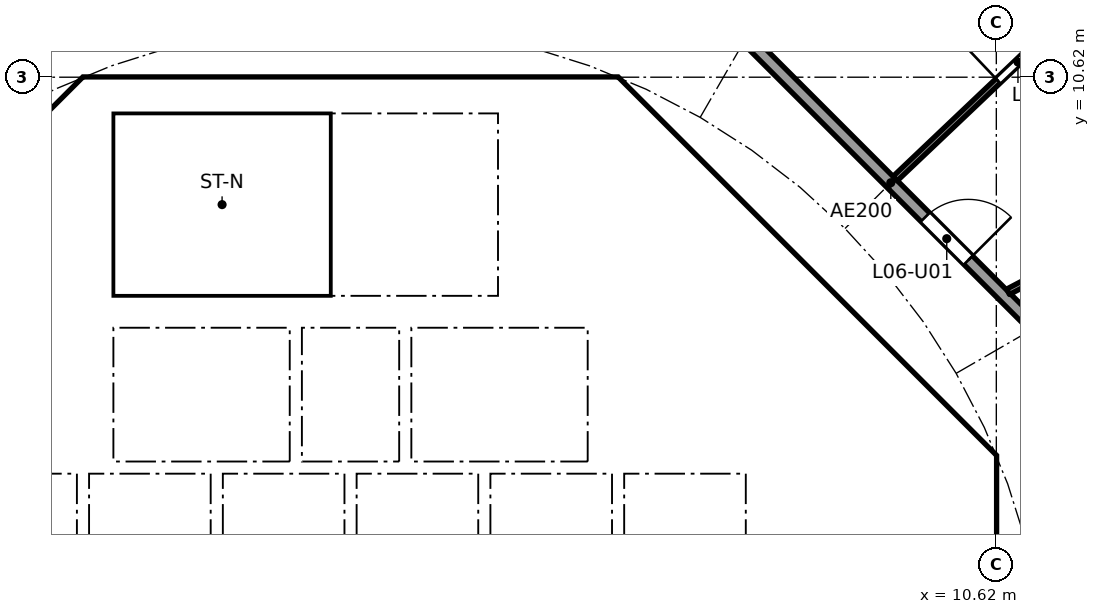
"""IFC4 building model, lengths in metres.
Left out: names, types, materials, properties, quantities, classifications, styles, units other than length and angle.
Written with IfcOpenShell. Run it as: python <this file> out.ifc"""

import sys

from ifc_helpers import new_model, si_unit, direction, frame, frame_2d, origin, place, context, subcontext, project, spatial, polyline, rectangle, outline, extrude, element, fill, save


model = new_model("IFC4")
c1 = context("Model", 3, precision=1e-05, world=origin(), true_north=direction((0.0, 1.0)))
c2 = subcontext(c1, "Body", "Model", "MODEL_VIEW")
j1 = project(units=[si_unit("LENGTHUNIT", "METRE"), si_unit("PLANEANGLEUNIT", "RADIAN")], contexts=[c1])
p1 = place(None, origin())
s1 = spatial("IfcSite", under=j1, at=p1, CompositionType="ELEMENT")
p2 = place(p1, origin())
s2 = spatial("IfcBuilding", under=s1, at=p2, CompositionType="ELEMENT")
p3 = place(p2, frame((0.0, 0.0, 30.7)))
s3 = spatial("IfcBuildingStorey", under=s2, at=p3, CompositionType="ELEMENT", Elevation=30.7)
p4 = place(p3, frame((9.988, 4.613, 0.0), z_axis=(0.0, 0.0, 1.0), x_axis=(-0.707106781187, 0.707106781187, 0.0)))
e1 = element("IfcWall", 1, at=p4, inside=s3, PredefinedType="SHEAR", context=c2, shape_type="SweptSolid", body=[
    extrude(rectangle(XDim=7.602, YDim=0.6, at=frame_2d((3.801, 0.0))), origin(), (0.0, 0.0, 1.0), 3.44),
])
p5 = place(p4, frame((3.201, 0.0, 0.0)))
e2 = element("IfcOpeningElement", 2, at=p5, cuts=e1, PredefinedType="OPENING", context=c2, shape_type="SweptSolid", body=[
    extrude(rectangle(XDim=1.2, YDim=2.1, at=frame_2d((0.6, 1.05))), frame((0.0, 0.31, 0.0), z_axis=(0.0, -1.0, 0.0), x_axis=(1.0, 0.0, 0.0)), (0.0, 0.0, 1.0), 0.62),
])
p6 = place(p3, frame((-4.613, 9.988, 0.0), z_axis=(0.0, 0.0, 1.0), x_axis=(-0.707106781187, -0.707106781187, 0.0)))
e3 = element("IfcWall", 3, at=p6, inside=s3, PredefinedType="SHEAR", context=c2, shape_type="SweptSolid", body=[
    extrude(rectangle(XDim=7.602, YDim=0.6, at=frame_2d((3.801, 0.0))), origin(), (0.0, 0.0, 1.0), 3.44),
])
p7 = place(p6, frame((0.351, 0.0, 0.0)))
e4 = element("IfcOpeningElement", 4, at=p7, cuts=e3, PredefinedType="OPENING", context=c2, shape_type="SweptSolid", body=[
    extrude(rectangle(XDim=1.1, YDim=2.1, at=frame_2d((0.55, 1.05))), frame((0.0, 0.31, 0.0), z_axis=(0.0, -1.0, 0.0), x_axis=(1.0, 0.0, 0.0)), (0.0, 0.0, 1.0), 0.62),
])
p8 = place(p3, frame((4.0, 4.3, 0.0), z_axis=(0.0, 0.0, 1.0), x_axis=(0.0, 1.0, 0.0)))
e5 = element("IfcWall", 5, at=p8, inside=s3, PredefinedType="SOLIDWALL", context=c2, shape_type="SweptSolid", body=[
    extrude(rectangle(XDim=2.2, YDim=0.2, at=frame_2d((1.1, 0.0))), origin(), (0.0, 0.0, 1.0), 3.44),
])
p9 = place(p8, frame((0.55, 0.0, 0.0)))
e6 = element("IfcOpeningElement", 6, at=p9, cuts=e5, PredefinedType="OPENING", context=c2, shape_type="SweptSolid", body=[
    extrude(rectangle(XDim=1.1, YDim=2.1, at=frame_2d((0.55, 1.05))), frame((0.0, 0.11, 0.0), z_axis=(0.0, -1.0, 0.0), x_axis=(1.0, 0.0, 0.0)), (0.0, 0.0, 1.0), 0.22),
])
p10 = place(p3, frame((-4.0, 4.3, 0.0), z_axis=(0.0, 0.0, 1.0), x_axis=(0.0, 1.0, 0.0)))
e7 = element("IfcWall", 7, at=p10, inside=s3, PredefinedType="SOLIDWALL", context=c2, shape_type="SweptSolid", body=[
    extrude(rectangle(XDim=2.2, YDim=0.2, at=frame_2d((1.1, 0.0))), origin(), (0.0, 0.0, 1.0), 3.44),
])
p11 = place(p10, frame((0.55, 0.0, 0.0)))
e8 = element("IfcOpeningElement", 8, at=p11, cuts=e7, PredefinedType="OPENING", context=c2, shape_type="SweptSolid", body=[
    extrude(rectangle(XDim=1.1, YDim=2.1, at=frame_2d((0.55, 1.05))), frame((0.0, 0.11, 0.0), z_axis=(0.0, -1.0, 0.0), x_axis=(1.0, 0.0, 0.0)), (0.0, 0.0, 1.0), 0.22),
])
p12 = place(p3, frame((6.7, 4.0, 0.0), z_axis=(0.0, 0.0, 1.0), x_axis=(1.0, 0.0, 0.0)))
e9 = element("IfcWall", 9, at=p12, inside=s3, PredefinedType="SOLIDWALL", context=c2, shape_type="SweptSolid", body=[
    extrude(rectangle(XDim=3.325, YDim=0.2, at=frame_2d((1.662, 0.0))), origin(), (0.0, 0.0, 1.0), 3.44),
])
p13 = place(p12, frame((1.25, 0.0, 0.0)))
e10 = element("IfcOpeningElement", 10, at=p13, cuts=e9, PredefinedType="OPENING", context=c2, shape_type="SweptSolid", body=[
    extrude(rectangle(XDim=1.1, YDim=2.1, at=frame_2d((0.55, 1.05))), frame((0.0, 0.11, 0.0), z_axis=(0.0, -1.0, 0.0), x_axis=(1.0, 0.0, 0.0)), (0.0, 0.0, 1.0), 0.22),
])
p14 = place(p3, frame((4.0, 7.025, 0.0), z_axis=(0.0, 0.0, 1.0), x_axis=(0.0, 1.0, 0.0)))
e11 = element("IfcWall", 11, at=p14, inside=s3, PredefinedType="SOLIDWALL", context=c2, shape_type="SweptSolid", body=[
    extrude(rectangle(XDim=3.0, YDim=0.2, at=frame_2d((1.5, 0.0))), origin(), (0.0, 0.0, 1.0), 3.44),
])
p15 = place(p14, frame((0.925, 0.0, 0.0)))
e12 = element("IfcOpeningElement", 12, at=p15, cuts=e11, PredefinedType="OPENING", context=c2, shape_type="SweptSolid", body=[
    extrude(rectangle(XDim=1.1, YDim=2.1, at=frame_2d((0.55, 1.05))), frame((0.0, 0.11, 0.0), z_axis=(0.0, -1.0, 0.0), x_axis=(1.0, 0.0, 0.0)), (0.0, 0.0, 1.0), 0.22),
])
p16 = place(p3, origin())
e13 = element("IfcWall", 13, at=p16, inside=s3, PredefinedType="SHEAR", context=c2, shape_type="SweptSolid", body=[
    extrude(outline(polyline([(-4.152, 10.025), (-4.401, 9.776), (-4.825, 10.2), (-4.401, 10.625), (4.401, 10.625), (4.825, 10.2), (4.401, 9.776), (4.152, 10.025), (-4.152, 10.025)])), origin(), (0.0, 0.0, 1.0), 3.44),
])
p17 = place(p3, origin())
e14 = element("IfcWall", 14, at=p17, inside=s3, PredefinedType="SHEAR", context=c2, shape_type="SweptSolid", body=[
    extrude(outline(polyline([(9.776, -4.401), (10.025, -4.152), (10.025, -3.801), (10.025, 4.152), (9.776, 4.401), (10.2, 4.825), (10.625, 4.401), (10.625, -4.401), (10.2, -4.825), (9.776, -4.401)])), origin(), (0.0, 0.0, 1.0), 3.44),
])
for number, where, z_axis, x_axis in (
    (15, (-0.9, 4.3, 0.0), (0.0, 0.0, 1.0), (0.0, 1.0, 0.0)),
    (16, (0.9, 4.3, 0.0), (0.0, 0.0, 1.0), (0.0, 1.0, 0.0)),
):
    element("IfcWall", number, at=place(p3, frame(where, z_axis=z_axis, x_axis=x_axis)), inside=s3, PredefinedType="SOLIDWALL", context=c2, shape_type="SweptSolid", body=[
        extrude(rectangle(XDim=2.2, YDim=0.2, at=frame_2d((1.1, 0.0))), origin(), (0.0, 0.0, 1.0), 3.44),
    ])
p18 = place(p3, origin())
e17 = element("IfcWall", 17, at=p18, inside=s3, PredefinedType="SOLIDWALL", context=c2, shape_type="SweptSolid", body=[
    extrude(outline(polyline([(-6.5, 2.1), (-6.7, 2.1), (-6.7, 4.3), (6.7, 4.3), (6.7, 2.1), (6.5, 2.1), (6.5, 4.1), (4.5, 4.1), (4.5, 2.1), (4.3, 2.1), (4.3, 4.1), (2.3, 4.1), (2.3, 2.1), (2.1, 2.1), (2.1, 4.1), (0.1, 4.1), (0.1, 2.1), (-0.1, 2.1), (-0.1, 4.1), (-2.1, 4.1), (-2.1, 2.1), (-2.3, 2.1), (-2.3, 4.1), (-4.3, 4.1), (-4.3, 2.1), (-4.5, 2.1), (-4.5, 4.1), (-6.5, 4.1), (-6.5, 2.1)])), origin(), (0.0, 0.0, 1.0), 3.44),
])
p19 = place(p3, origin())
e18 = element("IfcWall", 18, at=p19, inside=s3, PredefinedType="SOLIDWALL", context=c2, shape_type="SweptSolid", body=[
    extrude(outline(polyline([(-3.9, 7.025), (-4.1, 7.025), (-4.1, 10.025), (-3.9, 10.025), (-3.9, 7.025)])), origin(), (0.0, 0.0, 1.0), 3.44),
])
p20 = place(p3, origin())
e19 = element("IfcWall", 19, at=p20, inside=s3, PredefinedType="SOLIDWALL", context=c2, shape_type="SweptSolid", body=[
    extrude(outline(polyline([(4.1, 6.5), (-4.1, 6.5), (-4.1, 7.025), (4.1, 7.025), (4.1, 6.5)])), origin(), (0.0, 0.0, 1.0), 3.44),
])
p21 = place(p3, origin())
e20 = element("IfcWall", 20, at=p21, inside=s3, PredefinedType="SOLIDWALL", context=c2, shape_type="SweptSolid", body=[
    extrude(outline(polyline([(7.025, -3.9), (6.7, -3.9), (6.7, 3.9), (7.025, 3.9), (7.025, -3.9)])), origin(), (0.0, 0.0, 1.0), 3.44),
])
p22 = place(p3, frame((12.635, 5.134, 0.0), z_axis=(0.0, 0.0, 1.0), x_axis=(-0.707106781187, 0.707106781187, 0.0)))
e21 = element("IfcWall", 21, at=p22, inside=s3, PredefinedType="PARTITIONING", context=c2, shape_type="SweptSolid", body=[
    extrude(rectangle(XDim=10.609, YDim=0.2, at=frame_2d((5.305, 0.0))), origin(), (0.0, 0.0, 1.0), 3.44),
])
p23 = place(p22, frame((3.503, 0.0, 0.0)))
e22 = element("IfcOpeningElement", 22, at=p23, cuts=e21, PredefinedType="OPENING", context=c2, shape_type="SweptSolid", body=[
    extrude(rectangle(XDim=1.0, YDim=2.1, at=frame_2d((0.5, 1.05))), frame((0.0, 0.11, 0.0), z_axis=(0.0, -1.0, 0.0), x_axis=(1.0, 0.0, 0.0)), (0.0, 0.0, 1.0), 0.22),
])
p24 = place(p3, frame((10.813, 7.091, 0.0), z_axis=(0.0, 0.0, 1.0), x_axis=(0.885182649479, 0.465243674928, 0.0)))
e23 = element("IfcWall", 23, at=p24, inside=s3, PredefinedType="PARTITIONING", context=c2, shape_type="SweptSolid", body=[
    extrude(rectangle(XDim=12.551, YDim=0.1, at=frame_2d((6.275, 0.0))), origin(), (0.0, 0.0, 1.0), 2.687),
])
p25 = place(p24, frame((0.539, 0.0, 0.0)))
e24 = element("IfcOpeningElement", 24, at=p25, cuts=e23, PredefinedType="OPENING", context=c2, shape_type="SweptSolid", body=[
    extrude(rectangle(XDim=0.9, YDim=2.1, at=frame_2d((0.45, 1.05))), frame((0.0, 0.06, 0.0), z_axis=(0.0, -1.0, 0.0), x_axis=(1.0, 0.0, 0.0)), (0.0, 0.0, 1.0), 0.12),
])
p26 = place(p24, frame((8.494, 0.0, 0.0)))
e25 = element("IfcOpeningElement", 25, at=p26, cuts=e23, PredefinedType="OPENING", context=c2, shape_type="SweptSolid", body=[
    extrude(rectangle(XDim=0.9, YDim=2.1, at=frame_2d((0.45, 1.05))), frame((0.0, 0.06, 0.0), z_axis=(0.0, -1.0, 0.0), x_axis=(1.0, 0.0, 0.0)), (0.0, 0.0, 1.0), 0.12),
])
p27 = place(p3, frame((8.957, 8.953, 0.0), z_axis=(0.0, 0.0, 1.0), x_axis=(0.725250022034, 0.688485588476, 0.0)))
e26 = element("IfcWall", 26, at=p27, inside=s3, PredefinedType="PARTITIONING", context=c2, shape_type="SweptSolid", body=[
    extrude(rectangle(XDim=12.963, YDim=0.1, at=frame_2d((6.481, 0.0))), origin(), (0.0, 0.0, 1.0), 2.687),
])
p28 = place(p27, frame((2.333, 0.0, 0.0)))
e27 = element("IfcOpeningElement", 27, at=p28, cuts=e26, PredefinedType="OPENING", context=c2, shape_type="SweptSolid", body=[
    extrude(rectangle(XDim=0.9, YDim=2.1, at=frame_2d((0.45, 1.05))), frame((0.0, 0.06, 0.0), z_axis=(0.0, -1.0, 0.0), x_axis=(1.0, 0.0, 0.0)), (0.0, 0.0, 1.0), 0.12),
])
p29 = place(p27, frame((8.79, 0.0, 0.0)))
e28 = element("IfcOpeningElement", 28, at=p29, cuts=e26, PredefinedType="OPENING", context=c2, shape_type="SweptSolid", body=[
    extrude(rectangle(XDim=0.9, YDim=2.1, at=frame_2d((0.45, 1.05))), frame((0.0, 0.06, 0.0), z_axis=(0.0, -1.0, 0.0), x_axis=(1.0, 0.0, 0.0)), (0.0, 0.0, 1.0), 0.12),
])
p30 = place(p9, origin())
e29 = element("IfcDoor", 29, at=p30, inside=s3, OperationType="DOUBLE_DOOR_SLIDING", PredefinedType="DOOR", context=c2, shape_type="SweptSolid", body=[
    extrude(rectangle(XDim=1.1, YDim=2.1, at=frame_2d((0.55, 1.05))), frame((0.0, 0.025, 0.0), z_axis=(0.0, -1.0, 0.0), x_axis=(1.0, 0.0, 0.0)), (0.0, 0.0, 1.0), 0.05),
])
fill(e6, e29)
p31 = place(p11, origin())
e30 = element("IfcDoor", 30, at=p31, inside=s3, OperationType="DOUBLE_DOOR_SLIDING", PredefinedType="DOOR", context=c2, shape_type="SweptSolid", body=[
    extrude(rectangle(XDim=1.1, YDim=2.1, at=frame_2d((0.55, 1.05))), frame((0.0, 0.025, 0.0), z_axis=(0.0, -1.0, 0.0), x_axis=(1.0, 0.0, 0.0)), (0.0, 0.0, 1.0), 0.05),
])
fill(e8, e30)
p32 = place(p13, frame((1.1, 0.0, 0.0), x_axis=(-1.0, 0.0, 0.0)))
e31 = element("IfcDoor", 31, at=p32, inside=s3, OperationType="SINGLE_SWING_LEFT", PredefinedType="DOOR", context=c2, shape_type="SweptSolid", body=[
    extrude(rectangle(XDim=1.1, YDim=2.1, at=frame_2d((0.55, 1.05))), frame((0.0, 0.025, 0.0), z_axis=(0.0, -1.0, 0.0), x_axis=(1.0, 0.0, 0.0)), (0.0, 0.0, 1.0), 0.05),
])
fill(e10, e31)
p33 = place(p15, origin())
e32 = element("IfcDoor", 32, at=p33, inside=s3, OperationType="SINGLE_SWING_RIGHT", PredefinedType="DOOR", context=c2, shape_type="SweptSolid", body=[
    extrude(rectangle(XDim=1.1, YDim=2.1, at=frame_2d((0.55, 1.05))), frame((0.0, 0.025, 0.0), z_axis=(0.0, -1.0, 0.0), x_axis=(1.0, 0.0, 0.0)), (0.0, 0.0, 1.0), 0.05),
])
fill(e12, e32)
p34 = place(p5, origin())
e33 = element("IfcDoor", 33, at=p34, inside=s3, OperationType="SINGLE_SWING_RIGHT", PredefinedType="DOOR", context=c2, shape_type="SweptSolid", body=[
    extrude(rectangle(XDim=1.2, YDim=2.1, at=frame_2d((0.6, 1.05))), frame((0.0, 0.025, 0.0), z_axis=(0.0, -1.0, 0.0), x_axis=(1.0, 0.0, 0.0)), (0.0, 0.0, 1.0), 0.05),
])
fill(e2, e33)
p35 = place(p7, origin())
e34 = element("IfcDoor", 34, at=p35, inside=s3, OperationType="SINGLE_SWING_RIGHT", PredefinedType="DOOR", context=c2, shape_type="SweptSolid", body=[
    extrude(rectangle(XDim=1.1, YDim=2.1, at=frame_2d((0.55, 1.05))), frame((0.0, 0.025, 0.0), z_axis=(0.0, -1.0, 0.0), x_axis=(1.0, 0.0, 0.0)), (0.0, 0.0, 1.0), 0.05),
])
fill(e4, e34)
p36 = place(p23, frame((1.0, 0.0, 0.0), x_axis=(-1.0, 0.0, 0.0)))
e35 = element("IfcDoor", 35, at=p36, inside=s3, OperationType="SINGLE_SWING_RIGHT", PredefinedType="DOOR", context=c2, shape_type="SweptSolid", body=[
    extrude(rectangle(XDim=1.0, YDim=2.1, at=frame_2d((0.5, 1.05))), frame((0.0, 0.025, 0.0), z_axis=(0.0, -1.0, 0.0), x_axis=(1.0, 0.0, 0.0)), (0.0, 0.0, 1.0), 0.05),
])
fill(e22, e35)
p37 = place(p28, origin())
e36 = element("IfcDoor", 36, at=p37, inside=s3, OperationType="SINGLE_SWING_LEFT", PredefinedType="DOOR", context=c2, shape_type="SweptSolid", body=[
    extrude(rectangle(XDim=0.9, YDim=2.1, at=frame_2d((0.45, 1.05))), frame((0.0, 0.025, 0.0), z_axis=(0.0, -1.0, 0.0), x_axis=(1.0, 0.0, 0.0)), (0.0, 0.0, 1.0), 0.05),
])
fill(e27, e36)
save(model, sys.argv[1])
